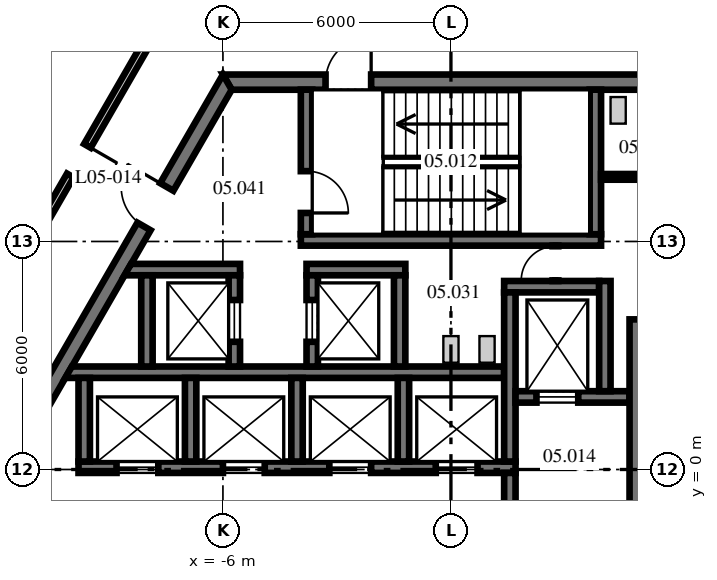
"""IFC4 building model, lengths in metres.
Left out: names, types, materials, properties, quantities, classifications, styles, units other than length and angle.
Written with IfcOpenShell. Run it as: python <this file> out.ifc"""

import sys

from ifc_helpers import new_model, si_unit, direction, frame, frame_2d, origin, place, context, subcontext, project, spatial, polyline, rectangle, outline, extrude, source, transform, mapped, element, fill, save


model = new_model("IFC4")
c1 = context("Model", 3, precision=1e-05, world=origin(), true_north=direction((0.0, 1.0)))
c2 = subcontext(c1, "Body", "Model", "MODEL_VIEW")
j1 = project(units=[si_unit("LENGTHUNIT", "METRE"), si_unit("PLANEANGLEUNIT", "RADIAN")], contexts=[c1])
p1 = place(None, origin())
s1 = spatial("IfcSite", under=j1, at=p1, CompositionType="ELEMENT")
p2 = place(p1, origin())
s2 = spatial("IfcBuilding", under=s1, at=p2, CompositionType="ELEMENT")
p3 = place(p2, frame((0.0, 0.0, 24.6)))
s3 = spatial("IfcBuildingStorey", under=s2, at=p3, CompositionType="ELEMENT", Elevation=24.6)
m1 = source(origin(), c2, "Body", "SweptSolid", [
    extrude(outline(polyline([(-0.115, -0.2), (11.885, -0.2), (11.654, 0.2), (0.115, 0.2), (-0.115, -0.2)])), origin(), (0.0, 0.0, 1.0), 4.1),
])
p4 = place(p3, frame((5.885, 10.192, 0.0), z_axis=(0.0, 0.0, 1.0), x_axis=(-1.0, 0.0, 0.0)))
e1 = element("IfcWall", 1, at=p4, inside=s3, PredefinedType="SHEAR", context=c2, shape_type="MappedRepresentation", body=[
    mapped(m1, transform((0.0, 0.0, 0.0), scale=1.0)),
])
p5 = place(p4, frame((7.985, 0.0, 0.0)))
e2 = element("IfcOpeningElement", 2, at=p5, cuts=e1, PredefinedType="OPENING", context=c2, shape_type="SweptSolid", body=[
    extrude(rectangle(XDim=1.2, YDim=2.1, at=frame_2d((0.6, 1.05))), frame((0.0, 0.21, 0.0), z_axis=(0.0, -1.0, 0.0), x_axis=(1.0, 0.0, 0.0)), (0.0, 0.0, 1.0), 0.42),
])
p6 = place(p3, frame((-5.885, 10.192, 0.0), z_axis=(0.0, 0.0, 1.0), x_axis=(-0.499996592174, -0.866027371285, 0.0)))
e3 = element("IfcWall", 3, at=p6, inside=s3, PredefinedType="SHEAR", context=c2, shape_type="MappedRepresentation", body=[
    mapped(m1, transform((0.0, 0.0, 0.0), scale=1.0)),
])
p7 = place(p6, frame((3.185, 0.0, 0.0)))
e4 = element("IfcOpeningElement", 4, at=p7, cuts=e3, PredefinedType="OPENING", context=c2, shape_type="SweptSolid", body=[
    extrude(rectangle(XDim=1.2, YDim=2.1, at=frame_2d((0.6, 1.05))), frame((0.0, 0.21, 0.0), z_axis=(0.0, -1.0, 0.0), x_axis=(1.0, 0.0, 0.0)), (0.0, 0.0, 1.0), 0.42),
])
p8 = place(p3, frame((-11.769, 0.0, 0.0), z_axis=(0.0, 0.0, 1.0), x_axis=(0.499996592174, -0.866027371285, 0.0)))
e5 = element("IfcWall", 5, at=p8, inside=s3, PredefinedType="SHEAR", context=c2, shape_type="MappedRepresentation", body=[
    mapped(m1, transform((0.0, 0.0, 0.0), scale=1.0)),
])
p9 = place(p8, frame((1.405, 0.0, 0.0)))
e6 = element("IfcOpeningElement", 6, at=p9, cuts=e5, PredefinedType="OPENING", context=c2, shape_type="SweptSolid", body=[
    extrude(rectangle(XDim=1.8, YDim=2.1, at=frame_2d((0.9, 1.05))), frame((0.0, 0.21, 0.0), z_axis=(0.0, -1.0, 0.0), x_axis=(1.0, 0.0, 0.0)), (0.0, 0.0, 1.0), 0.42),
])
p10 = place(p8, frame((7.915, 0.0, 0.0)))
e7 = element("IfcOpeningElement", 7, at=p10, cuts=e5, PredefinedType="OPENING", context=c2, shape_type="SweptSolid", body=[
    extrude(rectangle(XDim=1.2, YDim=2.1, at=frame_2d((0.6, 1.05))), frame((0.0, 0.21, 0.0), z_axis=(0.0, -1.0, 0.0), x_axis=(1.0, 0.0, 0.0)), (0.0, 0.0, 1.0), 0.42),
])
m2 = source(origin(), c2, "Body", "SweptSolid", [
    extrude(rectangle(XDim=11.5, YDim=0.3, at=frame_2d((5.75, 0.0))), origin(), (0.0, 0.0, 1.0), 4.1),
])
p11 = place(p3, frame((-9.8, 0.06, 0.0), z_axis=(0.0, 0.0, 1.0), x_axis=(1.0, 0.0, 0.0)))
e8 = element("IfcWall", 8, at=p11, inside=s3, PredefinedType="SHEAR", context=c2, shape_type="MappedRepresentation", body=[
    mapped(m2, transform((0.0, 0.0, 0.0), scale=1.0)),
])
p12 = place(p11, frame((1.0, 0.0, 0.0)))
e9 = element("IfcOpeningElement", 9, at=p12, cuts=e8, PredefinedType="OPENING", context=c2, shape_type="SweptSolid", body=[
    extrude(rectangle(XDim=1.1, YDim=2.1, at=frame_2d((0.55, 1.05))), frame((0.0, 0.16, 0.0), z_axis=(0.0, -1.0, 0.0), x_axis=(1.0, 0.0, 0.0)), (0.0, 0.0, 1.0), 0.32),
])
p13 = place(p11, frame((3.8, 0.0, 0.0)))
e10 = element("IfcOpeningElement", 10, at=p13, cuts=e8, PredefinedType="OPENING", context=c2, shape_type="SweptSolid", body=[
    extrude(rectangle(XDim=1.1, YDim=2.1, at=frame_2d((0.55, 1.05))), frame((0.0, 0.16, 0.0), z_axis=(0.0, -1.0, 0.0), x_axis=(1.0, 0.0, 0.0)), (0.0, 0.0, 1.0), 0.32),
])
p14 = place(p11, frame((6.6, 0.0, 0.0)))
e11 = element("IfcOpeningElement", 11, at=p14, cuts=e8, PredefinedType="OPENING", context=c2, shape_type="SweptSolid", body=[
    extrude(rectangle(XDim=1.1, YDim=2.1, at=frame_2d((0.55, 1.05))), frame((0.0, 0.16, 0.0), z_axis=(0.0, -1.0, 0.0), x_axis=(1.0, 0.0, 0.0)), (0.0, 0.0, 1.0), 0.32),
])
p15 = place(p11, frame((9.4, 0.0, 0.0)))
e12 = element("IfcOpeningElement", 12, at=p15, cuts=e8, PredefinedType="OPENING", context=c2, shape_type="SweptSolid", body=[
    extrude(rectangle(XDim=1.1, YDim=2.1, at=frame_2d((0.55, 1.05))), frame((0.0, 0.16, 0.0), z_axis=(0.0, -1.0, 0.0), x_axis=(1.0, 0.0, 0.0)), (0.0, 0.0, 1.0), 0.32),
])
m3 = source(origin(), c2, "Body", "SweptSolid", [
    extrude(outline(polyline([(11.2, -0.15), (-0.349, -0.15), (-0.176, 0.15), (11.2, 0.15), (11.2, -0.15)])), origin(), (0.0, 0.0, 1.0), 4.1),
])
p16 = place(p3, frame((-9.8, 2.56, 0.0), z_axis=(0.0, 0.0, 1.0), x_axis=(1.0, 0.0, 0.0)))
e13 = element("IfcWall", 13, at=p16, inside=s3, PredefinedType="SHEAR", context=c2, shape_type="MappedRepresentation", body=[
    mapped(m3, transform((0.0, 0.0, 0.0), scale=1.0)),
])
m4 = source(origin(), c2, "Body", "SweptSolid", [
    extrude(rectangle(XDim=2.5, YDim=0.3, at=frame_2d((1.25, 0.0))), origin(), (0.0, 0.0, 1.0), 4.1),
])
p17 = place(p3, frame((1.4, 4.81, 0.0), z_axis=(0.0, 0.0, 1.0), x_axis=(1.0, 0.0, 0.0)))
e14 = element("IfcWall", 14, at=p17, inside=s3, PredefinedType="SHEAR", context=c2, shape_type="MappedRepresentation", body=[
    mapped(m4, transform((0.0, 0.0, 0.0), scale=1.0)),
])
m5 = source(origin(), c2, "Body", "SweptSolid", [
    extrude(rectangle(XDim=4.45, YDim=0.3, at=frame_2d((2.225, 0.0))), origin(), (0.0, 0.0, 1.0), 4.1),
])
p18 = place(p3, frame((1.55, 0.21, 0.0), z_axis=(0.0, 0.0, 1.0), x_axis=(0.0, 1.0, 0.0)))
e15 = element("IfcWall", 15, at=p18, inside=s3, PredefinedType="SHEAR", context=c2, shape_type="MappedRepresentation", body=[
    mapped(m5, transform((0.0, 0.0, 0.0), scale=1.0)),
])
m6 = source(origin(), c2, "Body", "SweptSolid", [
    extrude(rectangle(XDim=3.0, YDim=0.3, at=frame_2d((1.5, 0.0))), origin(), (0.0, 0.0, 1.0), 4.1),
])
p19 = place(p3, frame((1.7, 1.91, 0.0), z_axis=(0.0, 0.0, 1.0), x_axis=(1.0, 0.0, 0.0)))
e16 = element("IfcWall", 16, at=p19, inside=s3, PredefinedType="SHEAR", context=c2, shape_type="MappedRepresentation", body=[
    mapped(m6, transform((0.0, 0.0, 0.0), scale=1.0)),
])
p20 = place(p19, frame((0.55, 0.0, 0.0)))
e17 = element("IfcOpeningElement", 17, at=p20, cuts=e16, PredefinedType="OPENING", context=c2, shape_type="SweptSolid", body=[
    extrude(rectangle(XDim=1.1, YDim=2.1, at=frame_2d((0.55, 1.05))), frame((0.0, 0.16, 0.0), z_axis=(0.0, -1.0, 0.0), x_axis=(1.0, 0.0, 0.0)), (0.0, 0.0, 1.0), 0.32),
])
m7 = source(origin(), c2, "Body", "SweptSolid", [
    extrude(rectangle(XDim=2.9, YDim=0.3, at=frame_2d((1.45, 0.0))), origin(), (0.0, 0.0, 1.0), 4.1),
])
p21 = place(p3, frame((4.05, 2.06, 0.0), z_axis=(0.0, 0.0, 1.0), x_axis=(0.0, 1.0, 0.0)))
e18 = element("IfcWall", 18, at=p21, inside=s3, PredefinedType="SHEAR", context=c2, shape_type="MappedRepresentation", body=[
    mapped(m7, transform((0.0, 0.0, 0.0), scale=1.0)),
])
m8 = source(origin(), c2, "Body", "SweptSolid", [
    extrude(rectangle(XDim=2.2, YDim=0.3, at=frame_2d((1.1, 0.0))), origin(), (0.0, 0.0, 1.0), 4.1),
])
p22 = place(p3, frame((-9.65, 0.21, 0.0), z_axis=(0.0, 0.0, 1.0), x_axis=(0.0, 1.0, 0.0)))
e19 = element("IfcWall", 19, at=p22, inside=s3, PredefinedType="SHEAR", context=c2, shape_type="MappedRepresentation", body=[
    mapped(m8, transform((0.0, 0.0, 0.0), scale=1.0)),
])
p23 = place(p3, frame((1.55, -3.09, 0.0), z_axis=(0.0, 0.0, 1.0), x_axis=(0.0, 1.0, 0.0)))
e20 = element("IfcWall", 20, at=p23, inside=s3, PredefinedType="SHEAR", context=c2, shape_type="MappedRepresentation", body=[
    mapped(m6, transform((0.0, 0.0, 0.0), scale=1.0)),
])
p24 = place(p23, frame((0.9, 0.0, 0.0)))
e21 = element("IfcOpeningElement", 21, at=p24, cuts=e20, PredefinedType="OPENING", context=c2, shape_type="SweptSolid", body=[
    extrude(rectangle(XDim=1.2, YDim=2.1, at=frame_2d((0.6, 1.05))), frame((0.0, 0.16, 0.0), z_axis=(0.0, -1.0, 0.0), x_axis=(1.0, 0.0, 0.0)), (0.0, 0.0, 1.0), 0.32),
])
m9 = source(origin(), c2, "Body", "SweptSolid", [
    extrude(outline(polyline([(-0.15, -0.15), (9.99, -0.15), (9.99, 0.15), (0.15, 0.15), (-0.15, -0.15)])), origin(), (0.0, 0.0, 1.0), 4.1),
])
p25 = place(p3, frame((4.85, -6.04, 0.0), z_axis=(0.0, 0.0, 1.0), x_axis=(0.0, 1.0, 0.0)))
e22 = element("IfcWall", 22, at=p25, inside=s3, PredefinedType="SHEAR", context=c2, shape_type="MappedRepresentation", body=[
    mapped(m9, transform((0.0, 0.0, 0.0), scale=1.0)),
])
p26 = place(p25, frame((3.19, 0.0, 0.0)))
e23 = element("IfcOpeningElement", 23, at=p26, cuts=e22, PredefinedType="OPENING", context=c2, shape_type="SweptSolid", body=[
    extrude(rectangle(XDim=1.1, YDim=2.1, at=frame_2d((0.55, 1.05))), frame((0.0, 0.16, 0.0), z_axis=(0.0, -1.0, 0.0), x_axis=(1.0, 0.0, 0.0)), (0.0, 0.0, 1.0), 0.32),
])
m10 = source(origin(), c2, "Body", "SweptSolid", [
    extrude(rectangle(XDim=7.9, YDim=0.3, at=frame_2d((3.95, 0.0))), origin(), (0.0, 0.0, 1.0), 4.1),
])
p27 = place(p3, frame((-3.95, 6.04, 0.0), z_axis=(0.0, 0.0, 1.0), x_axis=(1.0, 0.0, 0.0)))
e24 = element("IfcWall", 24, at=p27, inside=s3, PredefinedType="SHEAR", context=c2, shape_type="MappedRepresentation", body=[
    mapped(m10, transform((0.0, 0.0, 0.0), scale=1.0)),
])
m11 = source(origin(), c2, "Body", "SweptSolid", [
    extrude(outline(polyline([(0.0, -0.15), (0.0, 0.15), (3.804, 0.15), (3.804, -0.15), (0.0, -0.15)])), origin(), (0.0, 0.0, 1.0), 4.1),
])
p28 = place(p3, frame((-3.8, 6.19, 0.0), z_axis=(0.0, 0.0, 1.0), x_axis=(0.0, 1.0, 0.0)))
e25 = element("IfcWall", 25, at=p28, inside=s3, PredefinedType="SHEAR", context=c2, shape_type="MappedRepresentation", body=[
    mapped(m11, transform((0.0, 0.0, 0.0), scale=1.0)),
])
p29 = place(p28, frame((0.56, 0.0, 0.0)))
e26 = element("IfcOpeningElement", 26, at=p29, cuts=e25, PredefinedType="OPENING", context=c2, shape_type="SweptSolid", body=[
    extrude(rectangle(XDim=1.1, YDim=2.1, at=frame_2d((0.55, 1.05))), frame((0.0, 0.16, 0.0), z_axis=(0.0, -1.0, 0.0), x_axis=(1.0, 0.0, 0.0)), (0.0, 0.0, 1.0), 0.32),
])
p30 = place(p3, frame((3.8, 6.19, 0.0), z_axis=(0.0, 0.0, 1.0), x_axis=(0.0, 1.0, 0.0)))
e27 = element("IfcWall", 27, at=p30, inside=s3, PredefinedType="SHEAR", context=c2, shape_type="MappedRepresentation", body=[
    mapped(m11, transform((0.0, 0.0, 0.0), scale=1.0)),
])
m12 = source(origin(), c2, "Body", "SweptSolid", [
    extrude(outline(polyline([(2.6, -0.15), (-0.44, -0.15), (-0.267, 0.15), (2.6, 0.15), (2.6, -0.15)])), origin(), (0.0, 0.0, 1.0), 4.1),
])
p31 = place(p3, frame((-8.15, 5.26, 0.0), z_axis=(0.0, 0.0, 1.0), x_axis=(1.0, 0.0, 0.0)))
e28 = element("IfcWall", 28, at=p31, inside=s3, PredefinedType="SHEAR", context=c2, shape_type="MappedRepresentation", body=[
    mapped(m12, transform((0.0, 0.0, 0.0), scale=1.0)),
])
m13 = source(origin(), c2, "Body", "SweptSolid", [
    extrude(rectangle(XDim=2.4, YDim=0.3, at=frame_2d((1.2, 0.0))), origin(), (0.0, 0.0, 1.0), 4.1),
])
p32 = place(p3, frame((-8.0, 2.71, 0.0), z_axis=(0.0, 0.0, 1.0), x_axis=(0.0, 1.0, 0.0)))
e29 = element("IfcWall", 29, at=p32, inside=s3, PredefinedType="SHEAR", context=c2, shape_type="MappedRepresentation", body=[
    mapped(m13, transform((0.0, 0.0, 0.0), scale=1.0)),
])
p33 = place(p3, frame((-5.7, 2.71, 0.0), z_axis=(0.0, 0.0, 1.0), x_axis=(0.0, 1.0, 0.0)))
e30 = element("IfcWall", 30, at=p33, inside=s3, PredefinedType="SHEAR", context=c2, shape_type="MappedRepresentation", body=[
    mapped(m13, transform((0.0, 0.0, 0.0), scale=1.0)),
])
p34 = place(p33, frame((0.65, 0.0, 0.0)))
e31 = element("IfcOpeningElement", 31, at=p34, cuts=e30, PredefinedType="OPENING", context=c2, shape_type="SweptSolid", body=[
    extrude(rectangle(XDim=1.1, YDim=2.1, at=frame_2d((0.55, 1.05))), frame((0.0, 0.16, 0.0), z_axis=(0.0, -1.0, 0.0), x_axis=(1.0, 0.0, 0.0)), (0.0, 0.0, 1.0), 0.32),
])
m14 = source(origin(), c2, "Body", "SweptSolid", [
    extrude(rectangle(XDim=2.6, YDim=0.3, at=frame_2d((1.3, 0.0))), origin(), (0.0, 0.0, 1.0), 4.1),
])
p35 = place(p3, frame((-3.8, 5.26, 0.0), z_axis=(0.0, 0.0, 1.0), x_axis=(1.0, 0.0, 0.0)))
e32 = element("IfcWall", 32, at=p35, inside=s3, PredefinedType="SHEAR", context=c2, shape_type="MappedRepresentation", body=[
    mapped(m14, transform((0.0, 0.0, 0.0), scale=1.0)),
])
p36 = place(p3, frame((-3.65, 2.71, 0.0), z_axis=(0.0, 0.0, 1.0), x_axis=(0.0, 1.0, 0.0)))
e33 = element("IfcWall", 33, at=p36, inside=s3, PredefinedType="SHEAR", context=c2, shape_type="MappedRepresentation", body=[
    mapped(m13, transform((0.0, 0.0, 0.0), scale=1.0)),
])
p37 = place(p36, frame((0.65, 0.0, 0.0)))
e34 = element("IfcOpeningElement", 34, at=p37, cuts=e33, PredefinedType="OPENING", context=c2, shape_type="SweptSolid", body=[
    extrude(rectangle(XDim=1.1, YDim=2.1, at=frame_2d((0.55, 1.05))), frame((0.0, 0.16, 0.0), z_axis=(0.0, -1.0, 0.0), x_axis=(1.0, 0.0, 0.0)), (0.0, 0.0, 1.0), 0.32),
])
p38 = place(p3, frame((-1.35, 2.71, 0.0), z_axis=(0.0, 0.0, 1.0), x_axis=(0.0, 1.0, 0.0)))
e35 = element("IfcWall", 35, at=p38, inside=s3, PredefinedType="SHEAR", context=c2, shape_type="MappedRepresentation", body=[
    mapped(m13, transform((0.0, 0.0, 0.0), scale=1.0)),
])
for number, where, z_axis, x_axis in (
    (36, (-6.85, 0.21, 0.0), (0.0, 0.0, 1.0), (0.0, 1.0, 0.0)),
    (37, (-4.05, 0.21, 0.0), (0.0, 0.0, 1.0), (0.0, 1.0, 0.0)),
    (38, (-1.25, 0.21, 0.0), (0.0, 0.0, 1.0), (0.0, 1.0, 0.0)),
):
    element("IfcWall", number, at=place(p3, frame(where, z_axis=z_axis, x_axis=x_axis)), inside=s3, PredefinedType="SHEAR", context=c2, shape_type="MappedRepresentation", body=[
        mapped(m8, transform((0.0, 0.0, 0.0), scale=1.0)),
    ])
m15 = source(origin(), c2, "Body", "SweptSolid", [
    extrude(outline(polyline([(0.0, -0.075), (0.0, 0.075), (3.102, 0.075), (3.188, -0.075), (0.0, -0.075)])), origin(), (0.0, 0.0, 1.0), 4.1),
])
p39 = place(p3, frame((3.95, 7.7, 0.0), z_axis=(0.0, 0.0, 1.0), x_axis=(1.0, 0.0, 0.0)))
e39 = element("IfcWall", 39, at=p39, inside=s3, PredefinedType="PARTITIONING", context=c2, shape_type="MappedRepresentation", body=[
    mapped(m15, transform((0.0, 0.0, 0.0), scale=1.0)),
])
p40 = place(p39, frame((1.6, 0.0, 0.0)))
e40 = element("IfcOpeningElement", 40, at=p40, cuts=e39, PredefinedType="OPENING", context=c2, shape_type="SweptSolid", body=[
    extrude(rectangle(XDim=0.9, YDim=2.1, at=frame_2d((0.45, 1.05))), frame((0.0, 0.085, 0.0), z_axis=(0.0, -1.0, 0.0), x_axis=(1.0, 0.0, 0.0)), (0.0, 0.0, 1.0), 0.17),
])
m16 = source(origin(), c2, "Body", "SweptSolid", [
    extrude(rectangle(XDim=0.93, YDim=0.15, at=frame_2d((0.465, 0.0))), origin(), (0.0, 0.0, 1.0), 4.1),
])
p41 = place(p3, frame((2.75, 4.96, 0.0), z_axis=(0.0, 0.0, 1.0), x_axis=(0.0, 1.0, 0.0)))
e41 = element("IfcWall", 41, at=p41, inside=s3, PredefinedType="PARTITIONING", context=c2, shape_type="MappedRepresentation", body=[
    mapped(m16, transform((0.0, 0.0, 0.0), scale=1.0)),
])
p42 = place(p41, frame((0.015, 0.0, 0.0)))
e42 = element("IfcOpeningElement", 42, at=p42, cuts=e41, PredefinedType="OPENING", context=c2, shape_type="SweptSolid", body=[
    extrude(rectangle(XDim=0.9, YDim=2.1, at=frame_2d((0.45, 1.05))), frame((0.0, 0.085, 0.0), z_axis=(0.0, -1.0, 0.0), x_axis=(1.0, 0.0, 0.0)), (0.0, 0.0, 1.0), 0.17),
])
m17 = source(origin(), c2, "Body", "SweptSolid", [
    extrude(rectangle(XDim=10.082, YDim=0.2, at=frame_2d((5.041, 0.0))), origin(), (0.0, 0.0, 1.0), 4.1),
])
p43 = place(p3, frame((-12.307, 3.768, 0.0), z_axis=(0.0, 0.0, 1.0), x_axis=(0.500014523669, 0.866017018378, 0.0)))
e43 = element("IfcWall", 43, at=p43, inside=s3, PredefinedType="PARTITIONING", context=c2, shape_type="MappedRepresentation", body=[
    mapped(m17, transform((0.0, 0.0, 0.0), scale=1.0)),
])
p44 = place(p43, frame((4.582, 0.0, 0.0)))
e44 = element("IfcOpeningElement", 44, at=p44, cuts=e43, PredefinedType="OPENING", context=c2, shape_type="SweptSolid", body=[
    extrude(rectangle(XDim=0.9, YDim=2.1, at=frame_2d((0.45, 1.05))), frame((0.0, 0.11, 0.0), z_axis=(0.0, -1.0, 0.0), x_axis=(1.0, 0.0, 0.0)), (0.0, 0.0, 1.0), 0.22),
])
p45 = place(p5, frame((1.2, 0.0, 0.0), z_axis=(0.0, 0.0, 1.0), x_axis=(-1.0, 0.0, 0.0)))
e45 = element("IfcDoor", 45, at=p45, inside=s3, OperationType="SINGLE_SWING_RIGHT", PredefinedType="DOOR", context=c2, shape_type="SweptSolid", body=[
    extrude(rectangle(XDim=1.2, YDim=2.1, at=frame_2d((0.6, 1.05))), frame((0.0, 0.025, 0.0), z_axis=(0.0, -1.0, 0.0), x_axis=(1.0, 0.0, 0.0)), (0.0, 0.0, 1.0), 0.05),
])
fill(e2, e45)
p46 = place(p7, frame((1.2, 0.0, 0.0), z_axis=(0.0, 0.0, 1.0), x_axis=(-1.0, 0.0, 0.0)))
e46 = element("IfcDoor", 46, at=p46, inside=s3, OperationType="SINGLE_SWING_RIGHT", PredefinedType="DOOR", context=c2, shape_type="SweptSolid", body=[
    extrude(rectangle(XDim=1.2, YDim=2.1, at=frame_2d((0.6, 1.05))), frame((0.0, 0.025, 0.0), z_axis=(0.0, -1.0, 0.0), x_axis=(1.0, 0.0, 0.0)), (0.0, 0.0, 1.0), 0.05),
])
fill(e4, e46)
p47 = place(p29, frame((1.1, 0.0, 0.0), z_axis=(0.0, 0.0, 1.0), x_axis=(-1.0, 0.0, 0.0)))
e47 = element("IfcDoor", 47, at=p47, inside=s3, OperationType="SINGLE_SWING_RIGHT", PredefinedType="DOOR", context=c2, shape_type="SweptSolid", body=[
    extrude(rectangle(XDim=1.1, YDim=2.1, at=frame_2d((0.55, 1.05))), frame((0.0, 0.025, 0.0), z_axis=(0.0, -1.0, 0.0), x_axis=(1.0, 0.0, 0.0)), (0.0, 0.0, 1.0), 0.05),
])
fill(e26, e47)
p48 = place(p42, origin())
e48 = element("IfcDoor", 48, at=p48, inside=s3, OperationType="SINGLE_SWING_LEFT", PredefinedType="DOOR", context=c2, shape_type="SweptSolid", body=[
    extrude(rectangle(XDim=0.9, YDim=2.1, at=frame_2d((0.45, 1.05))), frame((0.0, 0.025, 0.0), z_axis=(0.0, -1.0, 0.0), x_axis=(1.0, 0.0, 0.0)), (0.0, 0.0, 1.0), 0.05),
])
fill(e42, e48)
p49 = place(p12, origin())
e49 = element("IfcDoor", 49, at=p49, inside=s3, OperationType="DOUBLE_DOOR_SLIDING", PredefinedType="DOOR", context=c2, shape_type="SweptSolid", body=[
    extrude(rectangle(XDim=1.1, YDim=2.1, at=frame_2d((0.55, 1.05))), frame((0.0, 0.025, 0.0), z_axis=(0.0, -1.0, 0.0), x_axis=(1.0, 0.0, 0.0)), (0.0, 0.0, 1.0), 0.05),
])
fill(e9, e49)
p50 = place(p13, origin())
e50 = element("IfcDoor", 50, at=p50, inside=s3, OperationType="DOUBLE_DOOR_SLIDING", PredefinedType="DOOR", context=c2, shape_type="SweptSolid", body=[
    extrude(rectangle(XDim=1.1, YDim=2.1, at=frame_2d((0.55, 1.05))), frame((0.0, 0.025, 0.0), z_axis=(0.0, -1.0, 0.0), x_axis=(1.0, 0.0, 0.0)), (0.0, 0.0, 1.0), 0.05),
])
fill(e10, e50)
p51 = place(p14, origin())
e51 = element("IfcDoor", 51, at=p51, inside=s3, OperationType="DOUBLE_DOOR_SLIDING", PredefinedType="DOOR", context=c2, shape_type="SweptSolid", body=[
    extrude(rectangle(XDim=1.1, YDim=2.1, at=frame_2d((0.55, 1.05))), frame((0.0, 0.025, 0.0), z_axis=(0.0, -1.0, 0.0), x_axis=(1.0, 0.0, 0.0)), (0.0, 0.0, 1.0), 0.05),
])
fill(e11, e51)
p52 = place(p15, origin())
e52 = element("IfcDoor", 52, at=p52, inside=s3, OperationType="DOUBLE_DOOR_SLIDING", PredefinedType="DOOR", context=c2, shape_type="SweptSolid", body=[
    extrude(rectangle(XDim=1.1, YDim=2.1, at=frame_2d((0.55, 1.05))), frame((0.0, 0.025, 0.0), z_axis=(0.0, -1.0, 0.0), x_axis=(1.0, 0.0, 0.0)), (0.0, 0.0, 1.0), 0.05),
])
fill(e12, e52)
p53 = place(p20, origin())
e53 = element("IfcDoor", 53, at=p53, inside=s3, OperationType="DOUBLE_DOOR_SLIDING", PredefinedType="DOOR", context=c2, shape_type="SweptSolid", body=[
    extrude(rectangle(XDim=1.1, YDim=2.1, at=frame_2d((0.55, 1.05))), frame((0.0, 0.025, 0.0), z_axis=(0.0, -1.0, 0.0), x_axis=(1.0, 0.0, 0.0)), (0.0, 0.0, 1.0), 0.05),
])
fill(e17, e53)
p54 = place(p34, origin())
e54 = element("IfcDoor", 54, at=p54, inside=s3, OperationType="DOUBLE_DOOR_SLIDING", PredefinedType="DOOR", context=c2, shape_type="SweptSolid", body=[
    extrude(rectangle(XDim=1.1, YDim=2.1, at=frame_2d((0.55, 1.05))), frame((0.0, 0.025, 0.0), z_axis=(0.0, -1.0, 0.0), x_axis=(1.0, 0.0, 0.0)), (0.0, 0.0, 1.0), 0.05),
])
fill(e31, e54)
p55 = place(p37, origin())
e55 = element("IfcDoor", 55, at=p55, inside=s3, OperationType="DOUBLE_DOOR_SLIDING", PredefinedType="DOOR", context=c2, shape_type="SweptSolid", body=[
    extrude(rectangle(XDim=1.1, YDim=2.1, at=frame_2d((0.55, 1.05))), frame((0.0, 0.025, 0.0), z_axis=(0.0, -1.0, 0.0), x_axis=(1.0, 0.0, 0.0)), (0.0, 0.0, 1.0), 0.05),
])
fill(e34, e55)
p56 = place(p44, origin())
e56 = element("IfcDoor", 56, at=p56, inside=s3, OperationType="SINGLE_SWING_RIGHT", PredefinedType="DOOR", context=c2, shape_type="SweptSolid", body=[
    extrude(rectangle(XDim=0.9, YDim=2.1, at=frame_2d((0.45, 1.05))), frame((0.0, 0.025, 0.0), z_axis=(0.0, -1.0, 0.0), x_axis=(1.0, 0.0, 0.0)), (0.0, 0.0, 1.0), 0.05),
])
fill(e44, e56)
save(model, sys.argv[1])
